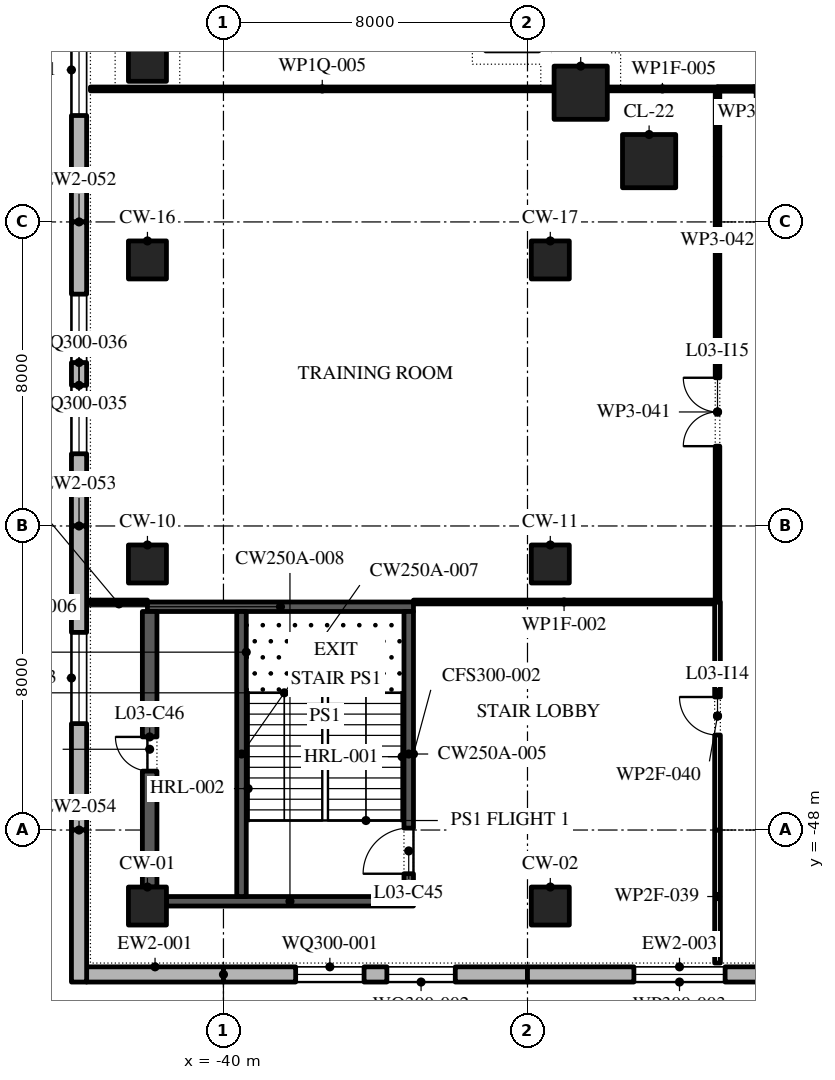
"""IFC4 building model, lengths in metres.
Left out: names, types, materials, properties, quantities, classifications, styles, units other than length and angle.
Written with IfcOpenShell. Run it as: python <this file> out.ifc"""

import sys

from ifc_helpers import new_model, si_unit, direction, frame, frame_2d, origin, origin_2d, place, context, subcontext, project, spatial, polyline, rectangle, outline, extrude, element, fill, save


model = new_model("IFC4")
c1 = context("Model", 3, precision=1e-05, world=origin(), true_north=direction((0.0, 1.0)))
c2 = subcontext(c1, "Body", "Model", "MODEL_VIEW")
j1 = project(units=[si_unit("LENGTHUNIT", "METRE"), si_unit("PLANEANGLEUNIT", "RADIAN")], contexts=[c1])
p1 = place(None, origin())
s1 = spatial("IfcSite", under=j1, at=p1, CompositionType="ELEMENT")
p2 = place(p1, origin())
s2 = spatial("IfcBuilding", under=s1, at=p2, CompositionType="ELEMENT")
p3 = place(p2, frame((0.0, 0.0, 19.2)))
s3 = spatial("IfcBuildingStorey", under=s2, at=p3, CompositionType="ELEMENT", Elevation=19.2)
for number, where, z_axis, x_axis in (
    (1, (-42.0, -50.0, 0.0), (0.0, 0.0, 1.0), (1.0, 0.0, 0.0)),
    (2, (-31.4, -50.0, 0.0), (0.0, 0.0, 1.0), (1.0, 0.0, 0.0)),
    (3, (-42.0, -41.0, 0.0), (0.0, 0.0, 1.0), (1.0, 0.0, 0.0)),
    (4, (-31.4, -41.0, 0.0), (0.0, 0.0, 1.0), (1.0, 0.0, 0.0)),
    (5, (-42.0, -33.0, 0.0), (0.0, 0.0, 1.0), (1.0, 0.0, 0.0)),
    (6, (-31.4, -33.0, 0.0), (0.0, 0.0, 1.0), (1.0, 0.0, 0.0)),
):
    element("IfcColumn", number, at=place(p3, frame(where, z_axis=z_axis, x_axis=x_axis)), inside=s3, PredefinedType="COLUMN", context=c2, shape_type="SweptSolid", body=[
        extrude(rectangle(XDim=1.0, YDim=1.0, at=origin_2d()), origin(), (0.0, 0.0, 1.0), 4.8),
    ])
for number, where, z_axis, x_axis in (
    (7, (-28.8, -30.4, 0.0), (0.0, 0.0, 1.0), (1.0, 0.0, 0.0)),
    (8, (-30.6, -28.6, 0.0), (0.0, 0.0, 1.0), (1.0, 0.0, 0.0)),
):
    element("IfcColumn", number, at=place(p3, frame(where, z_axis=z_axis, x_axis=x_axis)), inside=s3, PredefinedType="COLUMN", context=c2, shape_type="SweptSolid", body=[
        extrude(rectangle(XDim=1.4, YDim=1.4, at=origin_2d()), origin(), (0.0, 0.0, 1.0), 4.8),
    ])
p4 = place(p3, frame((-42.0, -27.8, 0.0), z_axis=(0.0, 0.0, 1.0), x_axis=(1.0, 0.0, 0.0)))
e9 = element("IfcColumn", 9, at=p4, inside=s3, PredefinedType="COLUMN", context=c2, shape_type="SweptSolid", body=[
    extrude(rectangle(XDim=1.0, YDim=1.0, at=origin_2d()), origin(), (0.0, 0.0, 1.0), 4.8),
])
p5 = place(p3, frame((-43.6, -51.8, 0.0), z_axis=(0.0, 0.0, 1.0), x_axis=(1.0, 0.0, 0.0)))
e10 = element("IfcWall", 10, at=p5, inside=s3, PredefinedType="STANDARD", context=c2, shape_type="SweptSolid", body=[
    extrude(rectangle(XDim=3.6, YDim=0.4, at=frame_2d((1.8, 0.0))), origin(), (0.0, 0.0, 1.0), 4.5),
])
p6 = place(p3, frame((-40.0, -51.8, 0.0), z_axis=(0.0, 0.0, 1.0), x_axis=(1.0, 0.0, 0.0)))
e11 = element("IfcWall", 11, at=p6, inside=s3, PredefinedType="STANDARD", context=c2, shape_type="SweptSolid", body=[
    extrude(rectangle(XDim=8.0, YDim=0.4, at=frame_2d((4.0, 0.0))), origin(), (0.0, 0.0, 1.0), 4.5),
])
p7 = place(p6, frame((1.9, 0.0, 0.9)))
e12 = element("IfcOpeningElement", 12, at=p7, cuts=e11, PredefinedType="OPENING", context=c2, shape_type="SweptSolid", body=[
    extrude(outline(polyline([(0.0, 0.0), (1.8, 0.0), (1.8, 1.5), (1.785, 1.729), (1.738, 1.954), (1.662, 2.17), (1.558, 2.375), (1.427, 2.563), (1.271, 2.732), (1.095, 2.879), (0.9, 3.0), (0.705, 2.879), (0.529, 2.732), (0.373, 2.563), (0.242, 2.375), (0.138, 2.17), (0.062, 1.954), (0.015, 1.729), (0.0, 1.5), (0.0, 0.0)])), frame((0.0, 0.21, 0.0), z_axis=(0.0, -1.0, 0.0), x_axis=(1.0, 0.0, 0.0)), (0.0, 0.0, 1.0), 0.42),
])
p8 = place(p6, frame((4.3, 0.0, 0.9)))
e13 = element("IfcOpeningElement", 13, at=p8, cuts=e11, PredefinedType="OPENING", context=c2, shape_type="SweptSolid", body=[
    extrude(outline(polyline([(0.0, 0.0), (1.8, 0.0), (1.8, 1.5), (1.785, 1.729), (1.738, 1.954), (1.662, 2.17), (1.558, 2.375), (1.427, 2.563), (1.271, 2.732), (1.095, 2.879), (0.9, 3.0), (0.705, 2.879), (0.529, 2.732), (0.373, 2.563), (0.242, 2.375), (0.138, 2.17), (0.062, 1.954), (0.015, 1.729), (0.0, 1.5), (0.0, 0.0)])), frame((0.0, 0.21, 0.0), z_axis=(0.0, -1.0, 0.0), x_axis=(1.0, 0.0, 0.0)), (0.0, 0.0, 1.0), 0.42),
])
p9 = place(p3, frame((-32.0, -51.8, 0.0), z_axis=(0.0, 0.0, 1.0), x_axis=(1.0, 0.0, 0.0)))
e14 = element("IfcWall", 14, at=p9, inside=s3, PredefinedType="STANDARD", context=c2, shape_type="SweptSolid", body=[
    extrude(rectangle(XDim=8.0, YDim=0.4, at=frame_2d((4.0, 0.0))), origin(), (0.0, 0.0, 1.0), 4.5),
])
p10 = place(p9, frame((2.8, 0.0, 0.9)))
e15 = element("IfcOpeningElement", 15, at=p10, cuts=e14, PredefinedType="OPENING", context=c2, shape_type="SweptSolid", body=[
    extrude(outline(polyline([(0.0, 0.0), (2.4, 0.0), (2.4, 1.5), (2.378, 1.758), (2.313, 2.009), (2.207, 2.245), (2.063, 2.46), (1.885, 2.648), (1.677, 2.804), (1.447, 2.922), (1.2, 3.0), (0.953, 2.922), (0.722, 2.804), (0.515, 2.648), (0.337, 2.46), (0.193, 2.245), (0.087, 2.009), (0.022, 1.758), (0.0, 1.5), (0.0, 0.0)])), frame((0.0, 0.21, 0.0), z_axis=(0.0, -1.0, 0.0), x_axis=(1.0, 0.0, 0.0)), (0.0, 0.0, 1.0), 0.42),
])
p11 = place(p3, frame((-43.8, -24.0, 0.0), z_axis=(0.0, 0.0, 1.0), x_axis=(0.0, -1.0, 0.0)))
e16 = element("IfcWall", 16, at=p11, inside=s3, PredefinedType="STANDARD", context=c2, shape_type="SweptSolid", body=[
    extrude(rectangle(XDim=8.0, YDim=0.4, at=frame_2d((4.0, 0.0))), origin(), (0.0, 0.0, 1.0), 4.5),
])
p12 = place(p11, frame((2.8, 0.0, 0.9)))
e17 = element("IfcOpeningElement", 17, at=p12, cuts=e16, PredefinedType="OPENING", context=c2, shape_type="SweptSolid", body=[
    extrude(outline(polyline([(0.0, 0.0), (2.4, 0.0), (2.4, 1.5), (2.378, 1.758), (2.313, 2.009), (2.207, 2.245), (2.063, 2.46), (1.885, 2.648), (1.677, 2.804), (1.447, 2.922), (1.2, 3.0), (0.953, 2.922), (0.722, 2.804), (0.515, 2.648), (0.337, 2.46), (0.193, 2.245), (0.087, 2.009), (0.022, 1.758), (0.0, 1.5), (0.0, 0.0)])), frame((0.0, 0.21, 0.0), z_axis=(0.0, -1.0, 0.0), x_axis=(1.0, 0.0, 0.0)), (0.0, 0.0, 1.0), 0.42),
])
p13 = place(p3, frame((-43.8, -32.0, 0.0), z_axis=(0.0, 0.0, 1.0), x_axis=(0.0, -1.0, 0.0)))
e18 = element("IfcWall", 18, at=p13, inside=s3, PredefinedType="STANDARD", context=c2, shape_type="SweptSolid", body=[
    extrude(rectangle(XDim=8.0, YDim=0.4, at=frame_2d((4.0, 0.0))), origin(), (0.0, 0.0, 1.0), 4.5),
])
p14 = place(p13, frame((1.9, 0.0, 0.9)))
e19 = element("IfcOpeningElement", 19, at=p14, cuts=e18, PredefinedType="OPENING", context=c2, shape_type="SweptSolid", body=[
    extrude(outline(polyline([(0.0, 0.0), (1.8, 0.0), (1.8, 1.5), (1.785, 1.729), (1.738, 1.954), (1.662, 2.17), (1.558, 2.375), (1.427, 2.563), (1.271, 2.732), (1.095, 2.879), (0.9, 3.0), (0.705, 2.879), (0.529, 2.732), (0.373, 2.563), (0.242, 2.375), (0.138, 2.17), (0.062, 1.954), (0.015, 1.729), (0.0, 1.5), (0.0, 0.0)])), frame((0.0, 0.21, 0.0), z_axis=(0.0, -1.0, 0.0), x_axis=(1.0, 0.0, 0.0)), (0.0, 0.0, 1.0), 0.42),
])
p15 = place(p13, frame((4.3, 0.0, 0.9)))
e20 = element("IfcOpeningElement", 20, at=p15, cuts=e18, PredefinedType="OPENING", context=c2, shape_type="SweptSolid", body=[
    extrude(outline(polyline([(0.0, 0.0), (1.8, 0.0), (1.8, 1.5), (1.785, 1.729), (1.738, 1.954), (1.662, 2.17), (1.558, 2.375), (1.427, 2.563), (1.271, 2.732), (1.095, 2.879), (0.9, 3.0), (0.705, 2.879), (0.529, 2.732), (0.373, 2.563), (0.242, 2.375), (0.138, 2.17), (0.062, 1.954), (0.015, 1.729), (0.0, 1.5), (0.0, 0.0)])), frame((0.0, 0.21, 0.0), z_axis=(0.0, -1.0, 0.0), x_axis=(1.0, 0.0, 0.0)), (0.0, 0.0, 1.0), 0.42),
])
p16 = place(p3, frame((-43.8, -40.0, 0.0), z_axis=(0.0, 0.0, 1.0), x_axis=(0.0, -1.0, 0.0)))
e21 = element("IfcWall", 21, at=p16, inside=s3, PredefinedType="STANDARD", context=c2, shape_type="SweptSolid", body=[
    extrude(rectangle(XDim=8.0, YDim=0.4, at=frame_2d((4.0, 0.0))), origin(), (0.0, 0.0, 1.0), 4.5),
])
p17 = place(p16, frame((2.8, 0.0, 0.9)))
e22 = element("IfcOpeningElement", 22, at=p17, cuts=e21, PredefinedType="OPENING", context=c2, shape_type="SweptSolid", body=[
    extrude(outline(polyline([(0.0, 0.0), (2.4, 0.0), (2.4, 1.5), (2.378, 1.758), (2.313, 2.009), (2.207, 2.245), (2.063, 2.46), (1.885, 2.648), (1.677, 2.804), (1.447, 2.922), (1.2, 3.0), (0.953, 2.922), (0.722, 2.804), (0.515, 2.648), (0.337, 2.46), (0.193, 2.245), (0.087, 2.009), (0.022, 1.758), (0.0, 1.5), (0.0, 0.0)])), frame((0.0, 0.21, 0.0), z_axis=(0.0, -1.0, 0.0), x_axis=(1.0, 0.0, 0.0)), (0.0, 0.0, 1.0), 0.42),
])
p18 = place(p3, frame((-43.8, -48.0, 0.0), z_axis=(0.0, 0.0, 1.0), x_axis=(0.0, -1.0, 0.0)))
e23 = element("IfcWall", 23, at=p18, inside=s3, PredefinedType="STANDARD", context=c2, shape_type="SweptSolid", body=[
    extrude(rectangle(XDim=4.0, YDim=0.4, at=frame_2d((2.0, 0.0))), origin(), (0.0, 0.0, 1.0), 4.5),
])
p19 = place(p3, frame((-41.5, -49.875, 0.0), z_axis=(0.0, 0.0, 1.0), x_axis=(1.0, 0.0, 0.0)))
e24 = element("IfcWall", 24, at=p19, inside=s3, PredefinedType="SHEAR", context=c2, shape_type="SweptSolid", body=[
    extrude(rectangle(XDim=6.5, YDim=0.25, at=frame_2d((3.25, 0.0))), origin(), (0.0, 0.0, 1.0), 4.5),
])
p20 = place(p3, frame((-42.0, -42.125, 0.0), z_axis=(0.0, 0.0, 1.0), x_axis=(1.0, 0.0, 0.0)))
e25 = element("IfcWall", 25, at=p20, inside=s3, PredefinedType="SHEAR", context=c2, shape_type="SweptSolid", body=[
    extrude(rectangle(XDim=7.0, YDim=0.25, at=frame_2d((3.5, 0.0))), origin(), (0.0, 0.0, 1.0), 4.5),
])
p21 = place(p3, frame((-41.942, -49.5, 0.0), z_axis=(0.0, 0.0, 1.0), x_axis=(0.0, 1.0, 0.0)))
e26 = element("IfcWall", 26, at=p21, inside=s3, PredefinedType="SHEAR", context=c2, shape_type="SweptSolid", body=[
    extrude(rectangle(XDim=7.25, YDim=0.384, at=frame_2d((3.625, 0.0))), origin(), (0.0, 0.0, 1.0), 4.5),
])
p22 = place(p21, frame((3.05, 0.0, 0.0)))
e27 = element("IfcOpeningElement", 27, at=p22, cuts=e26, PredefinedType="OPENING", context=c2, shape_type="SweptSolid", body=[
    extrude(rectangle(XDim=0.9, YDim=2.1, at=frame_2d((0.45, 1.05))), frame((0.0, 0.202, 0.0), z_axis=(0.0, -1.0, 0.0), x_axis=(1.0, 0.0, 0.0)), (0.0, 0.0, 1.0), 0.404),
])
p23 = place(p3, frame((-35.125, -49.75, 0.0), z_axis=(0.0, 0.0, 1.0), x_axis=(0.0, 1.0, 0.0)))
e28 = element("IfcWall", 28, at=p23, inside=s3, PredefinedType="SHEAR", context=c2, shape_type="SweptSolid", body=[
    extrude(rectangle(XDim=7.5, YDim=0.25, at=frame_2d((3.75, 0.0))), origin(), (0.0, 0.0, 1.0), 4.5),
])
p24 = place(p23, frame((0.6, 0.0, 0.0)))
e29 = element("IfcOpeningElement", 29, at=p24, cuts=e28, PredefinedType="OPENING", context=c2, shape_type="SweptSolid", body=[
    extrude(rectangle(XDim=1.2, YDim=2.1, at=frame_2d((0.6, 1.05))), frame((0.0, 0.135, 0.0), z_axis=(0.0, -1.0, 0.0), x_axis=(1.0, 0.0, 0.0)), (0.0, 0.0, 1.0), 0.27),
])
p25 = place(p3, frame((-39.525, -49.75, 0.0), z_axis=(0.0, 0.0, 1.0), x_axis=(0.0, 1.0, 0.0)))
e30 = element("IfcWall", 30, at=p25, inside=s3, PredefinedType="SHEAR", context=c2, shape_type="SweptSolid", body=[
    extrude(rectangle(XDim=7.5, YDim=0.25, at=frame_2d((3.75, 0.0))), origin(), (0.0, 0.0, 1.0), 4.5),
])
p26 = place(p3, frame((-43.5, -42.0, 0.0), z_axis=(0.0, 0.0, 1.0), x_axis=(1.0, 0.0, 0.0)))
e31 = element("IfcWall", 31, at=p26, inside=s3, PredefinedType="PARTITIONING", context=c2, shape_type="SweptSolid", body=[
    extrude(rectangle(XDim=1.5, YDim=0.1, at=frame_2d((0.75, 0.0))), origin(), (0.0, 0.0, 1.0), 4.5),
])
p27 = place(p3, frame((-35.0, -42.0, 0.0), z_axis=(0.0, 0.0, 1.0), x_axis=(1.0, 0.0, 0.0)))
e32 = element("IfcWall", 32, at=p27, inside=s3, PredefinedType="PARTITIONING", context=c2, shape_type="SweptSolid", body=[
    extrude(rectangle(XDim=7.925, YDim=0.1, at=frame_2d((3.962, 0.0))), origin(), (0.0, 0.0, 1.0), 4.5),
])
p28 = place(p3, frame((-43.5, -28.5, 0.0), z_axis=(0.0, 0.0, 1.0), x_axis=(1.0, 0.0, 0.0)))
e33 = element("IfcWall", 33, at=p28, inside=s3, PredefinedType="PARTITIONING", context=c2, shape_type="SweptSolid", body=[
    extrude(rectangle(XDim=12.2, YDim=0.1, at=frame_2d((6.1, 0.0))), origin(), (0.0, 0.0, 1.0), 3.964),
])
p29 = place(p3, frame((-29.9, -28.5, 0.0), z_axis=(0.0, 0.0, 1.0), x_axis=(1.0, 0.0, 0.0)))
e34 = element("IfcWall", 34, at=p29, inside=s3, PredefinedType="PARTITIONING", context=c2, shape_type="SweptSolid", body=[
    extrude(rectangle(XDim=2.9, YDim=0.1, at=frame_2d((1.45, 0.0))), origin(), (0.0, 0.0, 1.0), 4.5),
])
p30 = place(p3, frame((-27.0, -28.5, 0.0), z_axis=(0.0, 0.0, 1.0), x_axis=(1.0, 0.0, 0.0)))
e35 = element("IfcWall", 35, at=p30, inside=s3, PredefinedType="PARTITIONING", context=c2, shape_type="SweptSolid", body=[
    extrude(rectangle(XDim=1.94, YDim=0.12, at=frame_2d((0.97, 0.0))), origin(), (0.0, 0.0, 1.0), 4.5),
])
p31 = place(p3, frame((-27.0, -51.5, 0.0), z_axis=(0.0, 0.0, 1.0), x_axis=(0.0, 1.0, 0.0)))
e36 = element("IfcWall", 36, at=p31, inside=s3, PredefinedType="PARTITIONING", context=c2, shape_type="SweptSolid", body=[
    extrude(rectangle(XDim=3.5, YDim=0.15, at=frame_2d((1.75, 0.0))), origin(), (0.0, 0.0, 1.0), 4.5),
])
p32 = place(p3, frame((-27.0, -48.0, 0.0), z_axis=(0.0, 0.0, 1.0), x_axis=(0.0, 1.0, 0.0)))
e37 = element("IfcWall", 37, at=p32, inside=s3, PredefinedType="PARTITIONING", context=c2, shape_type="SweptSolid", body=[
    extrude(rectangle(XDim=6.0, YDim=0.15, at=frame_2d((3.0, 0.0))), origin(), (0.0, 0.0, 1.0), 4.5),
])
p33 = place(p32, frame((2.5, 0.0, 0.0)))
e38 = element("IfcOpeningElement", 38, at=p33, cuts=e37, PredefinedType="OPENING", context=c2, shape_type="SweptSolid", body=[
    extrude(rectangle(XDim=1.0, YDim=2.1, at=frame_2d((0.5, 1.05))), frame((0.0, 0.085, 0.0), z_axis=(0.0, -1.0, 0.0), x_axis=(1.0, 0.0, 0.0)), (0.0, 0.0, 1.0), 0.17),
])
p34 = place(p3, frame((-27.0, -42.0, 0.0), z_axis=(0.0, 0.0, 1.0), x_axis=(0.0, 1.0, 0.0)))
e39 = element("IfcWall", 39, at=p34, inside=s3, PredefinedType="PARTITIONING", context=c2, shape_type="SweptSolid", body=[
    extrude(rectangle(XDim=10.0, YDim=0.12, at=frame_2d((5.0, 0.0))), origin(), (0.0, 0.0, 1.0), 4.5),
])
p35 = place(p34, frame((4.1, 0.0, 0.0)))
e40 = element("IfcOpeningElement", 40, at=p35, cuts=e39, PredefinedType="OPENING", context=c2, shape_type="SweptSolid", body=[
    extrude(rectangle(XDim=1.8, YDim=2.1, at=frame_2d((0.9, 1.05))), frame((0.0, 0.07, 0.0), z_axis=(0.0, -1.0, 0.0), x_axis=(1.0, 0.0, 0.0)), (0.0, 0.0, 1.0), 0.14),
])
p36 = place(p3, frame((-27.0, -32.0, 0.0), z_axis=(0.0, 0.0, 1.0), x_axis=(0.0, 1.0, 0.0)))
e41 = element("IfcWall", 41, at=p36, inside=s3, PredefinedType="PARTITIONING", context=c2, shape_type="SweptSolid", body=[
    extrude(rectangle(XDim=3.44, YDim=0.12, at=frame_2d((1.72, 0.0))), origin(), (0.0, 0.0, 1.0), 4.5),
])
p37 = place(p7, origin())
e42 = element("IfcWindow", 42, at=p37, inside=s3, PartitioningType="DOUBLE_PANEL_VERTICAL", PredefinedType="WINDOW", context=c2, shape_type="SweptSolid", body=[
    extrude(outline(polyline([(0.0, 0.0), (1.8, 0.0), (1.8, 1.5), (1.785, 1.729), (1.738, 1.954), (1.662, 2.17), (1.558, 2.375), (1.427, 2.563), (1.271, 2.732), (1.095, 2.879), (0.9, 3.0), (0.705, 2.879), (0.529, 2.732), (0.373, 2.563), (0.242, 2.375), (0.138, 2.17), (0.062, 1.954), (0.015, 1.729), (0.0, 1.5), (0.0, 0.0)])), frame((0.0, 0.03, 0.0), z_axis=(0.0, -1.0, 0.0), x_axis=(1.0, 0.0, 0.0)), (0.0, 0.0, 1.0), 0.06),
])
fill(e12, e42)
p38 = place(p8, origin())
e43 = element("IfcWindow", 43, at=p38, inside=s3, PartitioningType="DOUBLE_PANEL_VERTICAL", PredefinedType="WINDOW", context=c2, shape_type="SweptSolid", body=[
    extrude(outline(polyline([(0.0, 0.0), (1.8, 0.0), (1.8, 1.5), (1.785, 1.729), (1.738, 1.954), (1.662, 2.17), (1.558, 2.375), (1.427, 2.563), (1.271, 2.732), (1.095, 2.879), (0.9, 3.0), (0.705, 2.879), (0.529, 2.732), (0.373, 2.563), (0.242, 2.375), (0.138, 2.17), (0.062, 1.954), (0.015, 1.729), (0.0, 1.5), (0.0, 0.0)])), frame((0.0, 0.03, 0.0), z_axis=(0.0, -1.0, 0.0), x_axis=(1.0, 0.0, 0.0)), (0.0, 0.0, 1.0), 0.06),
])
fill(e13, e43)
p39 = place(p10, origin())
e44 = element("IfcWindow", 44, at=p39, inside=s3, PartitioningType="DOUBLE_PANEL_VERTICAL", PredefinedType="WINDOW", context=c2, shape_type="SweptSolid", body=[
    extrude(outline(polyline([(0.0, 0.0), (2.4, 0.0), (2.4, 1.5), (2.378, 1.758), (2.313, 2.009), (2.207, 2.245), (2.063, 2.46), (1.885, 2.648), (1.677, 2.804), (1.447, 2.922), (1.2, 3.0), (0.953, 2.922), (0.722, 2.804), (0.515, 2.648), (0.337, 2.46), (0.193, 2.245), (0.087, 2.009), (0.022, 1.758), (0.0, 1.5), (0.0, 0.0)])), frame((0.0, 0.03, 0.0), z_axis=(0.0, -1.0, 0.0), x_axis=(1.0, 0.0, 0.0)), (0.0, 0.0, 1.0), 0.06),
])
fill(e15, e44)
p40 = place(p12, origin())
e45 = element("IfcWindow", 45, at=p40, inside=s3, PartitioningType="DOUBLE_PANEL_VERTICAL", PredefinedType="WINDOW", context=c2, shape_type="SweptSolid", body=[
    extrude(outline(polyline([(0.0, 0.0), (2.4, 0.0), (2.4, 1.5), (2.378, 1.758), (2.313, 2.009), (2.207, 2.245), (2.063, 2.46), (1.885, 2.648), (1.677, 2.804), (1.447, 2.922), (1.2, 3.0), (0.953, 2.922), (0.722, 2.804), (0.515, 2.648), (0.337, 2.46), (0.193, 2.245), (0.087, 2.009), (0.022, 1.758), (0.0, 1.5), (0.0, 0.0)])), frame((0.0, 0.03, 0.0), z_axis=(0.0, -1.0, 0.0), x_axis=(1.0, 0.0, 0.0)), (0.0, 0.0, 1.0), 0.06),
])
fill(e17, e45)
p41 = place(p14, origin())
e46 = element("IfcWindow", 46, at=p41, inside=s3, PartitioningType="DOUBLE_PANEL_VERTICAL", PredefinedType="WINDOW", context=c2, shape_type="SweptSolid", body=[
    extrude(outline(polyline([(0.0, 0.0), (1.8, 0.0), (1.8, 1.5), (1.785, 1.729), (1.738, 1.954), (1.662, 2.17), (1.558, 2.375), (1.427, 2.563), (1.271, 2.732), (1.095, 2.879), (0.9, 3.0), (0.705, 2.879), (0.529, 2.732), (0.373, 2.563), (0.242, 2.375), (0.138, 2.17), (0.062, 1.954), (0.015, 1.729), (0.0, 1.5), (0.0, 0.0)])), frame((0.0, 0.03, 0.0), z_axis=(0.0, -1.0, 0.0), x_axis=(1.0, 0.0, 0.0)), (0.0, 0.0, 1.0), 0.06),
])
fill(e19, e46)
p42 = place(p15, origin())
e47 = element("IfcWindow", 47, at=p42, inside=s3, PartitioningType="DOUBLE_PANEL_VERTICAL", PredefinedType="WINDOW", context=c2, shape_type="SweptSolid", body=[
    extrude(outline(polyline([(0.0, 0.0), (1.8, 0.0), (1.8, 1.5), (1.785, 1.729), (1.738, 1.954), (1.662, 2.17), (1.558, 2.375), (1.427, 2.563), (1.271, 2.732), (1.095, 2.879), (0.9, 3.0), (0.705, 2.879), (0.529, 2.732), (0.373, 2.563), (0.242, 2.375), (0.138, 2.17), (0.062, 1.954), (0.015, 1.729), (0.0, 1.5), (0.0, 0.0)])), frame((0.0, 0.03, 0.0), z_axis=(0.0, -1.0, 0.0), x_axis=(1.0, 0.0, 0.0)), (0.0, 0.0, 1.0), 0.06),
])
fill(e20, e47)
p43 = place(p17, origin())
e48 = element("IfcWindow", 48, at=p43, inside=s3, PartitioningType="DOUBLE_PANEL_VERTICAL", PredefinedType="WINDOW", context=c2, shape_type="SweptSolid", body=[
    extrude(outline(polyline([(0.0, 0.0), (2.4, 0.0), (2.4, 1.5), (2.378, 1.758), (2.313, 2.009), (2.207, 2.245), (2.063, 2.46), (1.885, 2.648), (1.677, 2.804), (1.447, 2.922), (1.2, 3.0), (0.953, 2.922), (0.722, 2.804), (0.515, 2.648), (0.337, 2.46), (0.193, 2.245), (0.087, 2.009), (0.022, 1.758), (0.0, 1.5), (0.0, 0.0)])), frame((0.0, 0.03, 0.0), z_axis=(0.0, -1.0, 0.0), x_axis=(1.0, 0.0, 0.0)), (0.0, 0.0, 1.0), 0.06),
])
fill(e22, e48)
p44 = place(p24, origin())
e49 = element("IfcDoor", 49, at=p44, inside=s3, OperationType="SINGLE_SWING_RIGHT", PredefinedType="DOOR", context=c2, shape_type="SweptSolid", body=[
    extrude(rectangle(XDim=1.2, YDim=2.1, at=frame_2d((0.6, 1.05))), frame((0.0, 0.025, 0.0), z_axis=(0.0, -1.0, 0.0), x_axis=(1.0, 0.0, 0.0)), (0.0, 0.0, 1.0), 0.05),
])
fill(e29, e49)
p45 = place(p22, origin())
e50 = element("IfcDoor", 50, at=p45, inside=s3, OperationType="SINGLE_SWING_LEFT", PredefinedType="DOOR", context=c2, shape_type="SweptSolid", body=[
    extrude(rectangle(XDim=0.9, YDim=2.1, at=frame_2d((0.45, 1.05))), frame((0.0, -0.142, 0.0), z_axis=(0.0, -1.0, 0.0), x_axis=(1.0, 0.0, 0.0)), (0.0, 0.0, 1.0), 0.05),
])
fill(e27, e50)
p46 = place(p33, origin())
e51 = element("IfcDoor", 51, at=p46, inside=s3, OperationType="SINGLE_SWING_LEFT", PredefinedType="DOOR", context=c2, shape_type="SweptSolid", body=[
    extrude(rectangle(XDim=1.0, YDim=2.1, at=frame_2d((0.5, 1.05))), frame((0.0, 0.025, 0.0), z_axis=(0.0, -1.0, 0.0), x_axis=(1.0, 0.0, 0.0)), (0.0, 0.0, 1.0), 0.05),
])
fill(e38, e51)
p47 = place(p35, origin())
e52 = element("IfcDoor", 52, at=p47, inside=s3, OperationType="SINGLE_SWING_LEFT", PredefinedType="DOOR", context=c2, shape_type="SweptSolid", body=[
    extrude(rectangle(XDim=1.8, YDim=2.1, at=frame_2d((0.9, 1.05))), frame((0.0, 0.025, 0.0), z_axis=(0.0, -1.0, 0.0), x_axis=(1.0, 0.0, 0.0)), (0.0, 0.0, 1.0), 0.05),
])
fill(e40, e52)
save(model, sys.argv[1])
